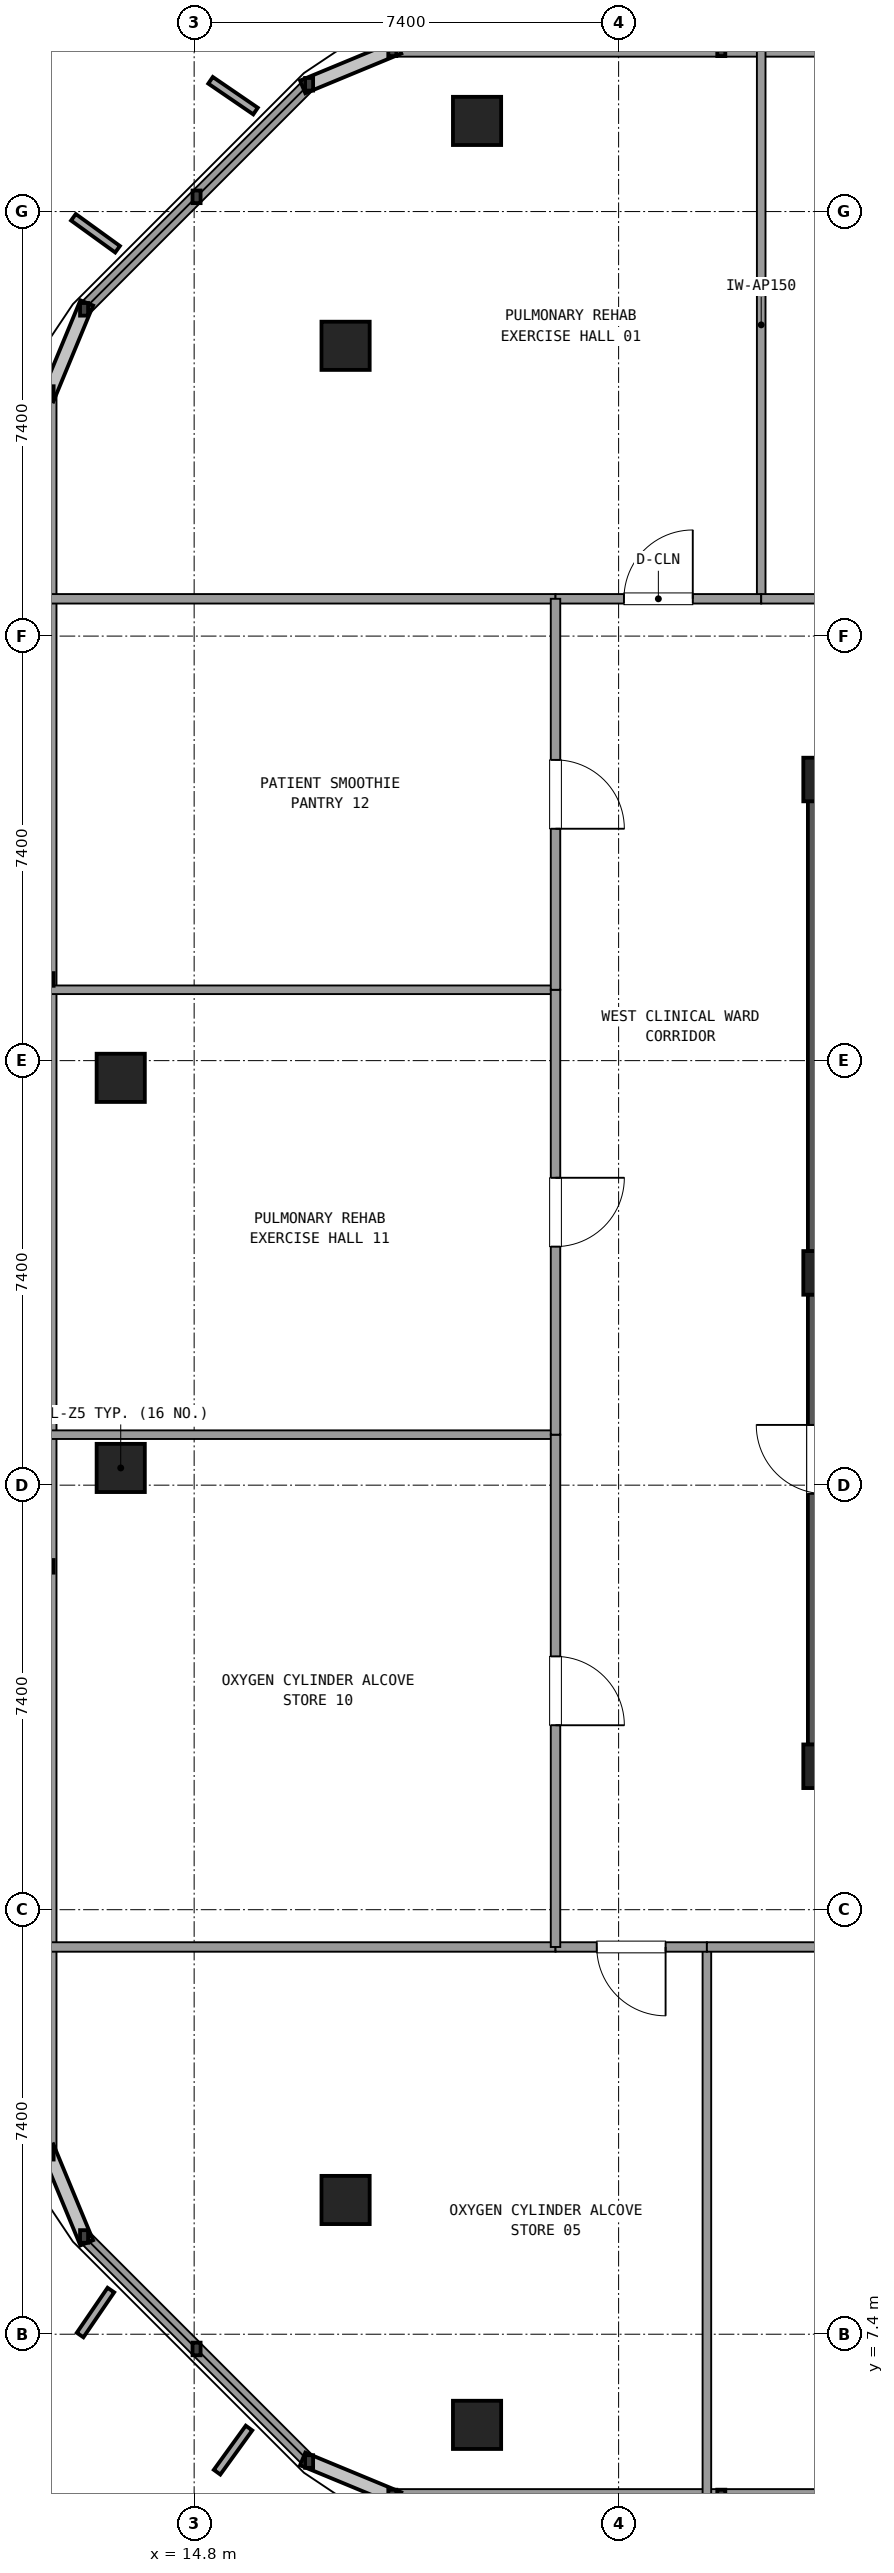
"""IFC4 building model, lengths in metres.
Left out: names, types, materials, properties, quantities, classifications, styles, units other than length and angle.
Written with IfcOpenShell. Run it as: python <this file> out.ifc"""

import sys

from ifc_helpers import new_model, si_unit, direction, frame, frame_2d, origin, origin_2d, place, context, subcontext, project, spatial, rectangle, extrude, element, fill, save


model = new_model("IFC4")
c1 = context("Model", 3, precision=1e-05, world=origin(), true_north=direction((0.0, 1.0)))
c2 = subcontext(c1, "Body", "Model", "MODEL_VIEW")
j1 = project(units=[si_unit("LENGTHUNIT", "METRE"), si_unit("PLANEANGLEUNIT", "RADIAN")], contexts=[c1])
p1 = place(None, origin())
s1 = spatial("IfcSite", under=j1, at=p1, CompositionType="ELEMENT")
p2 = place(p1, origin())
s2 = spatial("IfcBuilding", under=s1, at=p2, CompositionType="ELEMENT")
p3 = place(p2, frame((0.0, 0.0, 268.02)))
s3 = spatial("IfcBuildingStorey", under=s2, at=p3, CompositionType="ELEMENT", Elevation=268.02)
for number, where, z_axis, x_axis in (
    (1, (25.8, 17.3, 0.0), (0.0, 0.0, 1.0), (1.0, 0.0, 0.0)),
    (2, (25.8, 34.5, 0.0), (0.0, 0.0, 1.0), (1.0, 0.0, 0.0)),
    (3, (25.8, 25.9, 0.0), (0.0, 0.0, 1.0), (1.0, 0.0, 0.0)),
):
    element("IfcColumn", number, at=place(p3, frame(where, z_axis=z_axis, x_axis=x_axis)), inside=s3, PredefinedType="COLUMN", context=c2, shape_type="SweptSolid", body=[
        extrude(rectangle(XDim=0.76, YDim=0.76, at=origin_2d()), origin(), (0.0, 0.0, 1.0), 3.6),
    ])
p4 = place(p3, frame((25.8, 34.125, 0.0), z_axis=(0.0, 0.0, 1.0), x_axis=(0.0, -1.0, 0.0)))
e4 = element("IfcWall", 4, at=p4, inside=s3, PredefinedType="SHEAR", context=c2, shape_type="SweptSolid", body=[
    extrude(rectangle(XDim=7.85, YDim=0.6, at=frame_2d((3.925, 0.0))), origin(), (0.0, 0.0, 1.0), 3.32),
])
p5 = place(p3, frame((25.8, 25.525, 0.0), z_axis=(0.0, 0.0, 1.0), x_axis=(0.0, -1.0, 0.0)))
e5 = element("IfcWall", 5, at=p5, inside=s3, PredefinedType="SHEAR", context=c2, shape_type="SweptSolid", body=[
    extrude(rectangle(XDim=7.85, YDim=0.6, at=frame_2d((3.925, 0.0))), origin(), (0.0, 0.0, 1.0), 3.32),
])
p6 = place(p5, frame((2.275, 0.0, 0.0)))
e6 = element("IfcOpeningElement", 6, at=p6, cuts=e5, PredefinedType="OPENING", context=c2, shape_type="SweptSolid", body=[
    extrude(rectangle(XDim=1.2, YDim=2.15, at=frame_2d((0.6, 1.075))), frame((0.0, 0.31, 0.0), z_axis=(0.0, -1.0, 0.0), x_axis=(1.0, 0.0, 0.0)), (0.0, 0.0, 1.0), 0.62),
])
for number, where, z_axis, x_axis in (
    (7, (13.52, 22.5, 0.0), (0.0, 0.0, 1.0), (1.0, 0.0, 0.0)),
    (8, (17.44, 9.74, 0.0), (0.0, 0.0, 1.0), (1.0, 0.0, 0.0)),
    (9, (19.732, 5.82, 0.0), (0.0, 0.0, 1.0), (1.0, 0.0, 0.0)),
    (10, (19.732, 45.98, 0.0), (0.0, 0.0, 1.0), (1.0, 0.0, 0.0)),
    (11, (17.44, 42.06, 0.0), (0.0, 0.0, 1.0), (1.0, 0.0, 0.0)),
    (12, (13.52, 29.3, 0.0), (0.0, 0.0, 1.0), (1.0, 0.0, 0.0)),
):
    element("IfcColumn", number, at=place(p3, frame(where, z_axis=z_axis, x_axis=x_axis)), inside=s3, PredefinedType="COLUMN", context=c2, shape_type="SweptSolid", body=[
        extrude(rectangle(XDim=0.84, YDim=0.84, at=origin_2d()), origin(), (0.0, 0.0, 1.0), 3.6),
    ])
p7 = place(p3, frame((18.255, 4.58, 0.0), z_axis=(0.0, 0.0, 1.0), x_axis=(1.0, 0.0, 0.0)))
e13 = element("IfcWall", 13, at=p7, inside=s3, PredefinedType="SOLIDWALL", context=c2, shape_type="SweptSolid", body=[
    extrude(rectangle(XDim=17.204, YDim=0.24, at=frame_2d((8.602, 0.0))), origin(), (0.0, 0.0, 1.0), 0.85),
])
p8 = place(p3, frame((35.461, 47.22, 0.0), z_axis=(0.0, 0.0, 1.0), x_axis=(-1.0, 0.0, 0.0)))
e14 = element("IfcWall", 14, at=p8, inside=s3, PredefinedType="SOLIDWALL", context=c2, shape_type="SweptSolid", body=[
    extrude(rectangle(XDim=17.206, YDim=0.24, at=frame_2d((8.603, 0.0))), origin(), (0.0, 0.0, 1.0), 0.85),
])
p9 = place(p3, frame((16.804, 46.619, 0.0), z_axis=(0.0, 0.0, 1.0), x_axis=(-0.707106781187, -0.707106781187, 0.0)))
e15 = element("IfcWall", 15, at=p9, inside=s3, PredefinedType="SOLIDWALL", context=c2, shape_type="SweptSolid", body=[
    extrude(rectangle(XDim=5.548, YDim=0.24, at=frame_2d((2.774, 0.0))), origin(), (0.0, 0.0, 1.0), 0.85),
])
p10 = place(p3, frame((12.28, 41.245, 0.0), z_axis=(0.0, 0.0, 1.0), x_axis=(0.0, -1.0, 0.0)))
e16 = element("IfcWall", 16, at=p10, inside=s3, PredefinedType="SOLIDWALL", context=c2, shape_type="SweptSolid", body=[
    extrude(rectangle(XDim=30.69, YDim=0.24, at=frame_2d((15.345, 0.0))), origin(), (0.0, 0.0, 1.0), 0.85),
])
p11 = place(p3, frame((12.881, 9.104, 0.0), z_axis=(0.0, 0.0, 1.0), x_axis=(0.707084777957, -0.707128783731, 0.0)))
e17 = element("IfcWall", 17, at=p11, inside=s3, PredefinedType="SOLIDWALL", context=c2, shape_type="SweptSolid", body=[
    extrude(rectangle(XDim=5.548, YDim=0.24, at=frame_2d((2.774, 0.0))), origin(), (0.0, 0.0, 1.0), 0.85),
])
for number, where, z_axis, x_axis in (
    (18, (12.3, 37.65, 0.0), (0.0, 0.0, 1.0), (1.0, 0.0, 0.0)),
    (19, (12.3, 14.15, 0.0), (0.0, 0.0, 1.0), (1.0, 0.0, 0.0)),
):
    element("IfcWall", number, at=place(p3, frame(where, z_axis=z_axis, x_axis=x_axis)), inside=s3, PredefinedType="PARTITIONING", context=c2, shape_type="SweptSolid", body=[
        extrude(rectangle(XDim=8.8, YDim=0.165, at=frame_2d((4.4, 0.0))), origin(), (0.0, 0.0, 1.0), 2.61),
    ])
p12 = place(p3, frame((24.686, 37.65, 0.0), z_axis=(0.0, 0.0, 1.0), x_axis=(0.0, 1.0, 0.0)))
e20 = element("IfcWall", 20, at=p12, inside=s3, PredefinedType="PARTITIONING", context=c2, shape_type="SweptSolid", body=[
    extrude(rectangle(XDim=9.55, YDim=0.15, at=frame_2d((4.775, 0.0))), origin(), (0.0, 0.0, 1.0), 2.61),
])
p13 = place(p3, frame((21.1, 37.65, 0.0), z_axis=(0.0, 0.0, 1.0), x_axis=(1.0, 0.0, 0.0)))
e21 = element("IfcWall", 21, at=p13, inside=s3, PredefinedType="PARTITIONING", context=c2, shape_type="SweptSolid", body=[
    extrude(rectangle(XDim=3.586, YDim=0.165, at=frame_2d((1.793, 0.0))), origin(), (0.0, 0.0, 1.0), 2.61),
])
p14 = place(p13, frame((1.193, 0.0, 0.0)))
e22 = element("IfcOpeningElement", 22, at=p14, cuts=e21, PredefinedType="OPENING", context=c2, shape_type="SweptSolid", body=[
    extrude(rectangle(XDim=1.2, YDim=2.15, at=frame_2d((0.6, 1.075))), frame((0.0, 0.093, 0.0), z_axis=(0.0, -1.0, 0.0), x_axis=(1.0, 0.0, 0.0)), (0.0, 0.0, 1.0), 0.185),
])
p15 = place(p3, frame((24.686, 37.65, 0.0), z_axis=(0.0, 0.0, 1.0), x_axis=(1.0, 0.0, 0.0)))
e23 = element("IfcWall", 23, at=p15, inside=s3, PredefinedType="PARTITIONING", context=c2, shape_type="SweptSolid", body=[
    extrude(rectangle(XDim=10.514, YDim=0.165, at=frame_2d((5.257, 0.0))), origin(), (0.0, 0.0, 1.0), 2.61),
])
p16 = place(p15, frame((4.657, 0.0, 0.0)))
e24 = element("IfcOpeningElement", 24, at=p16, cuts=e23, PredefinedType="OPENING", context=c2, shape_type="SweptSolid", body=[
    extrude(rectangle(XDim=1.2, YDim=2.15, at=frame_2d((0.6, 1.075))), frame((0.0, 0.093, 0.0), z_axis=(0.0, -1.0, 0.0), x_axis=(1.0, 0.0, 0.0)), (0.0, 0.0, 1.0), 0.185),
])
p17 = place(p3, frame((23.739, 14.15, 0.0), z_axis=(0.0, 0.0, 1.0), x_axis=(0.0, -1.0, 0.0)))
e25 = element("IfcWall", 25, at=p17, inside=s3, PredefinedType="PARTITIONING", context=c2, shape_type="SweptSolid", body=[
    extrude(rectangle(XDim=9.55, YDim=0.15, at=frame_2d((4.775, 0.0))), origin(), (0.0, 0.0, 1.0), 2.61),
])
p18 = place(p3, frame((21.1, 14.15, 0.0), z_axis=(0.0, 0.0, 1.0), x_axis=(1.0, 0.0, 0.0)))
e26 = element("IfcWall", 26, at=p18, inside=s3, PredefinedType="PARTITIONING", context=c2, shape_type="SweptSolid", body=[
    extrude(rectangle(XDim=2.639, YDim=0.165, at=frame_2d((1.319, 0.0))), origin(), (0.0, 0.0, 1.0), 2.61),
])
p19 = place(p18, frame((0.719, 0.0, 0.0)))
e27 = element("IfcOpeningElement", 27, at=p19, cuts=e26, PredefinedType="OPENING", context=c2, shape_type="SweptSolid", body=[
    extrude(rectangle(XDim=1.2, YDim=2.15, at=frame_2d((0.6, 1.075))), frame((0.0, 0.093, 0.0), z_axis=(0.0, -1.0, 0.0), x_axis=(1.0, 0.0, 0.0)), (0.0, 0.0, 1.0), 0.185),
])
p20 = place(p3, frame((23.739, 14.15, 0.0), z_axis=(0.0, 0.0, 1.0), x_axis=(1.0, 0.0, 0.0)))
e28 = element("IfcWall", 28, at=p20, inside=s3, PredefinedType="PARTITIONING", context=c2, shape_type="SweptSolid", body=[
    extrude(rectangle(XDim=8.525, YDim=0.165, at=frame_2d((4.262, 0.0))), origin(), (0.0, 0.0, 1.0), 2.61),
])
p21 = place(p20, frame((3.663, 0.0, 0.0)))
e29 = element("IfcOpeningElement", 29, at=p21, cuts=e28, PredefinedType="OPENING", context=c2, shape_type="SweptSolid", body=[
    extrude(rectangle(XDim=1.2, YDim=2.15, at=frame_2d((0.6, 1.075))), frame((0.0, 0.093, 0.0), z_axis=(0.0, -1.0, 0.0), x_axis=(1.0, 0.0, 0.0)), (0.0, 0.0, 1.0), 0.185),
])
p22 = place(p3, frame((21.1, 23.08, 0.0), z_axis=(0.0, 0.0, 1.0), x_axis=(-1.0, 0.0, 0.0)))
e30 = element("IfcWall", 30, at=p22, inside=s3, PredefinedType="PARTITIONING", context=c2, shape_type="SweptSolid", body=[
    extrude(rectangle(XDim=8.8, YDim=0.15, at=frame_2d((4.4, 0.0))), origin(), (0.0, 0.0, 1.0), 2.61),
])
p23 = place(p3, frame((21.1, 14.15, 0.0), z_axis=(0.0, 0.0, 1.0), x_axis=(0.0, 1.0, 0.0)))
e31 = element("IfcWall", 31, at=p23, inside=s3, PredefinedType="PARTITIONING", context=c2, shape_type="SweptSolid", body=[
    extrude(rectangle(XDim=8.93, YDim=0.165, at=frame_2d((4.465, 0.0))), origin(), (0.0, 0.0, 1.0), 2.61),
])
p24 = place(p23, frame((3.865, 0.0, 0.0)))
e32 = element("IfcOpeningElement", 32, at=p24, cuts=e31, PredefinedType="OPENING", context=c2, shape_type="SweptSolid", body=[
    extrude(rectangle(XDim=1.2, YDim=2.15, at=frame_2d((0.6, 1.075))), frame((0.0, 0.093, 0.0), z_axis=(0.0, -1.0, 0.0), x_axis=(1.0, 0.0, 0.0)), (0.0, 0.0, 1.0), 0.185),
])
p25 = place(p3, frame((21.1, 30.835, 0.0), z_axis=(0.0, 0.0, 1.0), x_axis=(-1.0, 0.0, 0.0)))
e33 = element("IfcWall", 33, at=p25, inside=s3, PredefinedType="PARTITIONING", context=c2, shape_type="SweptSolid", body=[
    extrude(rectangle(XDim=8.8, YDim=0.15, at=frame_2d((4.4, 0.0))), origin(), (0.0, 0.0, 1.0), 2.61),
])
p26 = place(p3, frame((21.1, 23.08, 0.0), z_axis=(0.0, 0.0, 1.0), x_axis=(0.0, 1.0, 0.0)))
e34 = element("IfcWall", 34, at=p26, inside=s3, PredefinedType="PARTITIONING", context=c2, shape_type="SweptSolid", body=[
    extrude(rectangle(XDim=7.755, YDim=0.165, at=frame_2d((3.877, 0.0))), origin(), (0.0, 0.0, 1.0), 2.61),
])
p27 = place(p26, frame((3.278, 0.0, 0.0)))
e35 = element("IfcOpeningElement", 35, at=p27, cuts=e34, PredefinedType="OPENING", context=c2, shape_type="SweptSolid", body=[
    extrude(rectangle(XDim=1.2, YDim=2.15, at=frame_2d((0.6, 1.075))), frame((0.0, 0.093, 0.0), z_axis=(0.0, -1.0, 0.0), x_axis=(1.0, 0.0, 0.0)), (0.0, 0.0, 1.0), 0.185),
])
p28 = place(p3, frame((21.1, 30.835, 0.0), z_axis=(0.0, 0.0, 1.0), x_axis=(0.0, 1.0, 0.0)))
e36 = element("IfcWall", 36, at=p28, inside=s3, PredefinedType="PARTITIONING", context=c2, shape_type="SweptSolid", body=[
    extrude(rectangle(XDim=6.815, YDim=0.165, at=frame_2d((3.407, 0.0))), origin(), (0.0, 0.0, 1.0), 2.61),
])
p29 = place(p28, frame((2.807, 0.0, 0.0)))
e37 = element("IfcOpeningElement", 37, at=p29, cuts=e36, PredefinedType="OPENING", context=c2, shape_type="SweptSolid", body=[
    extrude(rectangle(XDim=1.2, YDim=2.15, at=frame_2d((0.6, 1.075))), frame((0.0, 0.093, 0.0), z_axis=(0.0, -1.0, 0.0), x_axis=(1.0, 0.0, 0.0)), (0.0, 0.0, 1.0), 0.185),
])
p30 = place(p14, origin())
e38 = element("IfcDoor", 38, at=p30, inside=s3, OperationType="SINGLE_SWING_RIGHT", PredefinedType="DOOR", context=c2, shape_type="SweptSolid", body=[
    extrude(rectangle(XDim=1.2, YDim=2.15, at=frame_2d((0.6, 1.075))), frame((0.0, 0.025, 0.0), z_axis=(0.0, -1.0, 0.0), x_axis=(1.0, 0.0, 0.0)), (0.0, 0.0, 1.0), 0.05),
])
fill(e22, e38)
p31 = place(p19, frame((1.2, 0.0, 0.0), z_axis=(0.0, 0.0, 1.0), x_axis=(-1.0, 0.0, 0.0)))
e39 = element("IfcDoor", 39, at=p31, inside=s3, OperationType="SINGLE_SWING_RIGHT", PredefinedType="DOOR", context=c2, shape_type="SweptSolid", body=[
    extrude(rectangle(XDim=1.2, YDim=2.15, at=frame_2d((0.6, 1.075))), frame((0.0, 0.025, 0.0), z_axis=(0.0, -1.0, 0.0), x_axis=(1.0, 0.0, 0.0)), (0.0, 0.0, 1.0), 0.05),
])
fill(e27, e39)
p32 = place(p24, frame((1.2, 0.0, 0.0), z_axis=(0.0, 0.0, 1.0), x_axis=(-1.0, 0.0, 0.0)))
e40 = element("IfcDoor", 40, at=p32, inside=s3, OperationType="SINGLE_SWING_LEFT", PredefinedType="DOOR", context=c2, shape_type="SweptSolid", body=[
    extrude(rectangle(XDim=1.2, YDim=2.15, at=frame_2d((0.6, 1.075))), frame((0.0, 0.025, 0.0), z_axis=(0.0, -1.0, 0.0), x_axis=(1.0, 0.0, 0.0)), (0.0, 0.0, 1.0), 0.05),
])
fill(e32, e40)
p33 = place(p27, frame((1.2, 0.0, 0.0), z_axis=(0.0, 0.0, 1.0), x_axis=(-1.0, 0.0, 0.0)))
e41 = element("IfcDoor", 41, at=p33, inside=s3, OperationType="SINGLE_SWING_RIGHT", PredefinedType="DOOR", context=c2, shape_type="SweptSolid", body=[
    extrude(rectangle(XDim=1.2, YDim=2.15, at=frame_2d((0.6, 1.075))), frame((0.0, 0.025, 0.0), z_axis=(0.0, -1.0, 0.0), x_axis=(1.0, 0.0, 0.0)), (0.0, 0.0, 1.0), 0.05),
])
fill(e35, e41)
p34 = place(p29, frame((1.2, 0.0, 0.0), z_axis=(0.0, 0.0, 1.0), x_axis=(-1.0, 0.0, 0.0)))
e42 = element("IfcDoor", 42, at=p34, inside=s3, OperationType="SINGLE_SWING_LEFT", PredefinedType="DOOR", context=c2, shape_type="SweptSolid", body=[
    extrude(rectangle(XDim=1.2, YDim=2.15, at=frame_2d((0.6, 1.075))), frame((0.0, 0.025, 0.0), z_axis=(0.0, -1.0, 0.0), x_axis=(1.0, 0.0, 0.0)), (0.0, 0.0, 1.0), 0.05),
])
fill(e37, e42)
save(model, sys.argv[1])
